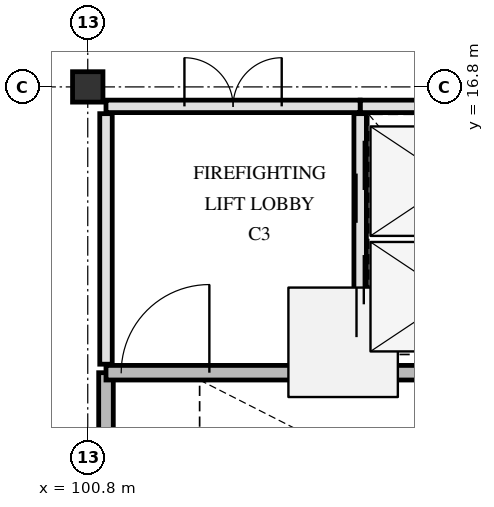
"""IFC4 building model, lengths in metres.
Left out: names, types, materials, properties, quantities, classifications, styles, units other than length and angle.
Written with IfcOpenShell. Run it as: python <this file> out.ifc"""

import sys

from ifc_helpers import new_model, si_unit, direction, frame, frame_2d, origin, origin_2d, place, context, subcontext, project, spatial, rectangle, extrude, element, fill, save


model = new_model("IFC4")
c1 = context("Model", 3, precision=1e-05, world=origin(), true_north=direction((0.0, 1.0)))
c2 = subcontext(c1, "Body", "Model", "MODEL_VIEW")
j1 = project(units=[si_unit("LENGTHUNIT", "METRE"), si_unit("PLANEANGLEUNIT", "RADIAN")], contexts=[c1])
p1 = place(None, origin())
s1 = spatial("IfcSite", under=j1, at=p1, CompositionType="ELEMENT")
p2 = place(p1, origin())
s2 = spatial("IfcBuilding", under=s1, at=p2, CompositionType="ELEMENT")
p3 = place(p2, frame((0.0, 0.0, 30.3)))
s3 = spatial("IfcBuildingStorey", under=s2, at=p3, CompositionType="ELEMENT", Elevation=30.3)
p4 = place(p3, frame((100.8, 16.8, 0.0), z_axis=(0.0, 0.0, 1.0), x_axis=(1.0, 0.0, 0.0)))
e1 = element("IfcColumn", 1, at=p4, inside=s3, PredefinedType="COLUMN", context=c2, shape_type="SweptSolid", body=[
    extrude(rectangle(XDim=0.5, YDim=0.5, at=origin_2d()), origin(), (0.0, 0.0, 1.0), 3.9),
])
p5 = place(p3, frame((101.1, 8.78, 0.0), z_axis=(0.0, 0.0, 1.0), x_axis=(0.0, 1.0, 0.0)))
e2 = element("IfcWall", 2, at=p5, inside=s3, PredefinedType="SHEAR", context=c2, shape_type="SweptSolid", body=[
    extrude(rectangle(XDim=3.32, YDim=0.24, at=frame_2d((1.66, 0.0))), origin(), (0.0, 0.0, 1.0), 3.66),
])
p6 = place(p3, frame((101.1, 12.1, 0.0), z_axis=(0.0, 0.0, 1.0), x_axis=(1.0, 0.0, 0.0)))
e3 = element("IfcWall", 3, at=p6, inside=s3, PredefinedType="SHEAR", context=c2, shape_type="SweptSolid", body=[
    extrude(rectangle(XDim=7.82, YDim=0.24, at=frame_2d((3.91, 0.0))), origin(), (0.0, 0.0, 1.0), 3.66),
])
p7 = place(p6, frame((0.25, 0.0, 0.0)))
e4 = element("IfcOpeningElement", 4, at=p7, cuts=e3, PredefinedType="OPENING", context=c2, shape_type="SweptSolid", body=[
    extrude(rectangle(XDim=1.45, YDim=2.2, at=frame_2d((0.725, 1.1))), frame((0.0, 0.13, 0.0), z_axis=(0.0, -1.0, 0.0), x_axis=(1.0, 0.0, 0.0)), (0.0, 0.0, 1.0), 0.26),
])
p8 = place(p3, frame((105.28, 12.24, 0.0), z_axis=(0.0, 0.0, 1.0), x_axis=(0.0, 1.0, 0.0)))
e5 = element("IfcWall", 5, at=p8, inside=s3, PredefinedType="PARTITIONING", context=c2, shape_type="SweptSolid", body=[
    extrude(rectangle(XDim=4.12, YDim=0.205, at=frame_2d((2.06, 0.0))), origin(), (0.0, 0.0, 1.0), 3.65),
])
p9 = place(p8, frame((0.445, 0.0, 0.0)))
e6 = element("IfcOpeningElement", 6, at=p9, cuts=e5, PredefinedType="OPENING", context=c2, shape_type="SweptSolid", body=[
    extrude(rectangle(XDim=1.35, YDim=2.2, at=frame_2d((0.675, 1.1))), frame((0.0, 0.113, 0.0), z_axis=(0.0, -1.0, 0.0), x_axis=(1.0, 0.0, 0.0)), (0.0, 0.0, 1.0), 0.225),
])
p10 = place(p8, frame((2.325, 0.0, 0.0)))
e7 = element("IfcOpeningElement", 7, at=p10, cuts=e5, PredefinedType="OPENING", context=c2, shape_type="SweptSolid", body=[
    extrude(rectangle(XDim=1.35, YDim=2.2, at=frame_2d((0.675, 1.1))), frame((0.0, 0.113, 0.0), z_axis=(0.0, -1.0, 0.0), x_axis=(1.0, 0.0, 0.0)), (0.0, 0.0, 1.0), 0.225),
])
p11 = place(p3, frame((105.28, 16.48, 0.0), z_axis=(0.0, 0.0, 1.0), x_axis=(1.0, 0.0, 0.0)))
e8 = element("IfcWall", 8, at=p11, inside=s3, PredefinedType="PARTITIONING", context=c2, shape_type="SweptSolid", body=[
    extrude(rectangle(XDim=3.57, YDim=0.205, at=frame_2d((1.785, 0.0))), origin(), (0.0, 0.0, 1.0), 3.65),
])
p12 = place(p3, frame((101.1, 12.24, 0.0), z_axis=(0.0, 0.0, 1.0), x_axis=(0.0, 1.0, 0.0)))
e9 = element("IfcWall", 9, at=p12, inside=s3, PredefinedType="PARTITIONING", context=c2, shape_type="SweptSolid", body=[
    extrude(rectangle(XDim=4.12, YDim=0.205, at=frame_2d((2.06, 0.0))), origin(), (0.0, 0.0, 1.0), 3.65),
])
p13 = place(p3, frame((101.1, 16.48, 0.0), z_axis=(0.0, 0.0, 1.0), x_axis=(1.0, 0.0, 0.0)))
e10 = element("IfcWall", 10, at=p13, inside=s3, PredefinedType="PARTITIONING", context=c2, shape_type="SweptSolid", body=[
    extrude(rectangle(XDim=4.18, YDim=0.205, at=frame_2d((2.09, 0.0))), origin(), (0.0, 0.0, 1.0), 3.65),
])
p14 = place(p13, frame((1.29, 0.0, 0.0)))
e11 = element("IfcOpeningElement", 11, at=p14, cuts=e10, PredefinedType="OPENING", context=c2, shape_type="SweptSolid", body=[
    extrude(rectangle(XDim=1.6, YDim=2.25, at=frame_2d((0.8, 1.125))), frame((0.0, 0.113, 0.0), z_axis=(0.0, -1.0, 0.0), x_axis=(1.0, 0.0, 0.0)), (0.0, 0.0, 1.0), 0.225),
])
p15 = place(p7, origin())
e12 = element("IfcDoor", 12, at=p15, inside=s3, OperationType="SINGLE_SWING_RIGHT", PredefinedType="DOOR", context=c2, shape_type="SweptSolid", body=[
    extrude(rectangle(XDim=1.45, YDim=2.2, at=frame_2d((0.725, 1.1))), frame((0.0, 0.025, 0.0), z_axis=(0.0, -1.0, 0.0), x_axis=(1.0, 0.0, 0.0)), (0.0, 0.0, 1.0), 0.05),
])
fill(e4, e12)
p16 = place(p9, origin())
e13 = element("IfcDoor", 13, at=p16, inside=s3, OperationType="SLIDING_TO_LEFT", PredefinedType="DOOR", context=c2, shape_type="SweptSolid", body=[
    extrude(rectangle(XDim=1.35, YDim=2.2, at=frame_2d((0.675, 1.1))), frame((0.0, 0.025, 0.0), z_axis=(0.0, -1.0, 0.0), x_axis=(1.0, 0.0, 0.0)), (0.0, 0.0, 1.0), 0.05),
])
fill(e6, e13)
p17 = place(p10, origin())
e14 = element("IfcDoor", 14, at=p17, inside=s3, OperationType="SLIDING_TO_LEFT", PredefinedType="DOOR", context=c2, shape_type="SweptSolid", body=[
    extrude(rectangle(XDim=1.35, YDim=2.2, at=frame_2d((0.675, 1.1))), frame((0.0, 0.025, 0.0), z_axis=(0.0, -1.0, 0.0), x_axis=(1.0, 0.0, 0.0)), (0.0, 0.0, 1.0), 0.05),
])
fill(e7, e14)
p18 = place(p14, origin())
e15 = element("IfcDoor", 15, at=p18, inside=s3, OperationType="DOUBLE_SWING_LEFT", PredefinedType="DOOR", context=c2, shape_type="SweptSolid", body=[
    extrude(rectangle(XDim=1.6, YDim=2.25, at=frame_2d((0.8, 1.125))), frame((0.0, 0.025, 0.0), z_axis=(0.0, -1.0, 0.0), x_axis=(1.0, 0.0, 0.0)), (0.0, 0.0, 1.0), 0.05),
])
fill(e11, e15)
save(model, sys.argv[1])
